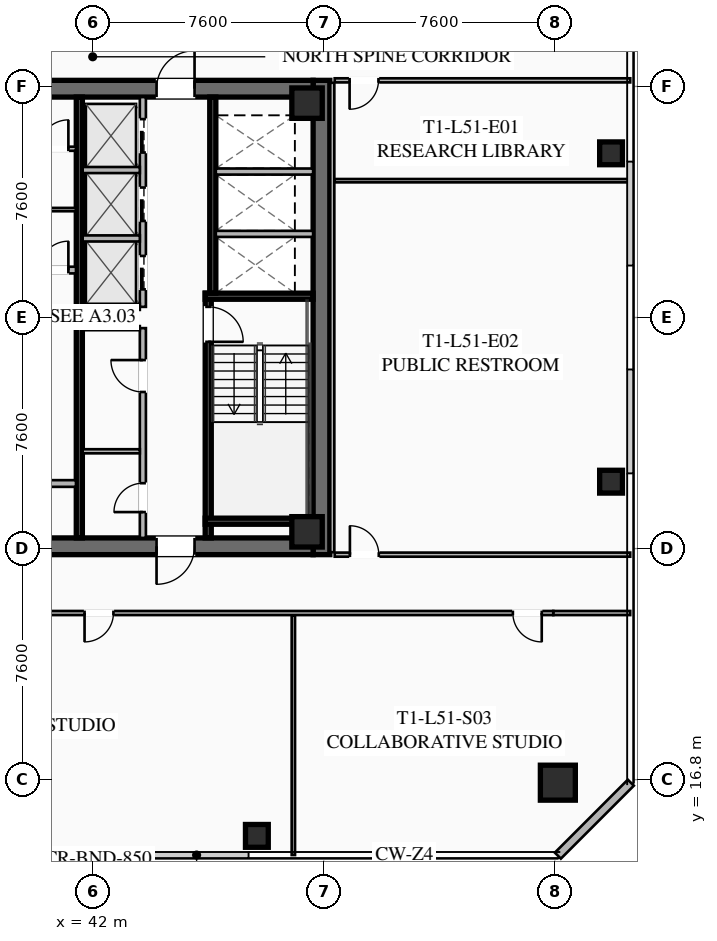
"""IFC4 building model, lengths in metres.
Left out: names, types, materials, properties, quantities, classifications, styles, units other than length and angle.
Written with IfcOpenShell. Run it as: python <this file> out.ifc"""

import sys

from ifc_helpers import new_model, si_unit, direction, frame, frame_2d, origin, origin_2d, place, context, subcontext, project, spatial, rectangle, hollow_rectangle, extrude, element, fill, save


model = new_model("IFC4")
c1 = context("Model", 3, precision=1e-05, world=origin(), true_north=direction((0.0, 1.0)))
c2 = subcontext(c1, "Body", "Model", "MODEL_VIEW")
j1 = project(units=[si_unit("LENGTHUNIT", "METRE"), si_unit("PLANEANGLEUNIT", "RADIAN")], contexts=[c1])
p1 = place(None, origin())
s1 = spatial("IfcSite", under=j1, at=p1, CompositionType="ELEMENT")
p2 = place(p1, origin())
s2 = spatial("IfcBuilding", under=s1, at=p2, CompositionType="ELEMENT")
p3 = place(p2, frame((0.0, 0.0, 188.95)))
s3 = spatial("IfcBuildingStorey", under=s2, at=p3, CompositionType="ELEMENT", Elevation=188.95)
p4 = place(p3, frame((49.525, 39.8, 0.0), z_axis=(0.0, 0.0, 1.0), x_axis=(0.0, -1.0, 0.0)))
e1 = element("IfcWall", 1, at=p4, inside=s3, PredefinedType="SHEAR", context=c2, shape_type="SweptSolid", body=[
    extrude(rectangle(XDim=15.6, YDim=0.55, at=frame_2d((7.8, 0.0))), origin(), (0.0, 0.0, 1.0), 3.55),
])
p5 = place(p3, frame((49.25, 24.475, 0.0), z_axis=(0.0, 0.0, 1.0), x_axis=(-1.0, 0.0, 0.0)))
e2 = element("IfcWall", 2, at=p5, inside=s3, PredefinedType="SHEAR", context=c2, shape_type="SweptSolid", body=[
    extrude(rectangle(XDim=14.5, YDim=0.55, at=frame_2d((7.25, 0.0))), origin(), (0.0, 0.0, 1.0), 3.55),
])
p6 = place(p5, frame((8.95, 0.0, 0.0)))
e3 = element("IfcOpeningElement", 3, at=p6, cuts=e2, PredefinedType="OPENING", context=c2, shape_type="SweptSolid", body=[
    extrude(rectangle(XDim=1.25, YDim=2.25, at=frame_2d((0.625, 1.125))), frame((0.0, 0.285, 0.0), z_axis=(0.0, -1.0, 0.0), x_axis=(1.0, 0.0, 0.0)), (0.0, 0.0, 1.0), 0.57),
])
p7 = place(p5, frame((3.9, 0.0, 0.0)))
e4 = element("IfcOpeningElement", 4, at=p7, cuts=e2, PredefinedType="OPENING", context=c2, shape_type="SweptSolid", body=[
    extrude(rectangle(XDim=1.25, YDim=2.25, at=frame_2d((0.625, 1.125))), frame((0.0, 0.285, 0.0), z_axis=(0.0, -1.0, 0.0), x_axis=(1.0, 0.0, 0.0)), (0.0, 0.0, 1.0), 0.57),
])
p8 = place(p3, frame((34.75, 39.525, 0.0), z_axis=(0.0, 0.0, 1.0), x_axis=(1.0, 0.0, 0.0)))
e5 = element("IfcWall", 5, at=p8, inside=s3, PredefinedType="SHEAR", context=c2, shape_type="SweptSolid", body=[
    extrude(rectangle(XDim=14.5, YDim=0.55, at=frame_2d((7.25, 0.0))), origin(), (0.0, 0.0, 1.0), 3.55),
])
p9 = place(p8, frame((4.3, 0.0, 0.0)))
e6 = element("IfcOpeningElement", 6, at=p9, cuts=e5, PredefinedType="OPENING", context=c2, shape_type="SweptSolid", body=[
    extrude(rectangle(XDim=1.25, YDim=2.25, at=frame_2d((0.625, 1.125))), frame((0.0, 0.285, 0.0), z_axis=(0.0, -1.0, 0.0), x_axis=(1.0, 0.0, 0.0)), (0.0, 0.0, 1.0), 0.57),
])
p10 = place(p8, frame((9.35, 0.0, 0.0)))
e7 = element("IfcOpeningElement", 7, at=p10, cuts=e5, PredefinedType="OPENING", context=c2, shape_type="SweptSolid", body=[
    extrude(rectangle(XDim=1.25, YDim=2.25, at=frame_2d((0.625, 1.125))), frame((0.0, 0.285, 0.0), z_axis=(0.0, -1.0, 0.0), x_axis=(1.0, 0.0, 0.0)), (0.0, 0.0, 1.0), 0.57),
])
for number, where, z_axis, x_axis in (
    (8, (49.05, 24.95, 0.0), (0.0, 0.0, 1.0), (1.0, 0.0, 0.0)),
    (9, (49.05, 39.05, 0.0), (0.0, 0.0, 1.0), (1.0, 0.0, 0.0)),
):
    element("IfcColumn", number, at=place(p3, frame(where, z_axis=z_axis, x_axis=x_axis)), inside=s3, PredefinedType="COLUMN", context=c2, shape_type="SweptSolid", body=[
        extrude(hollow_rectangle(XDim=1.0, YDim=1.0, WallThickness=0.04, at=origin_2d()), origin(), (0.0, 0.0, 1.0), 3.37),
    ])
p11 = place(p3, frame((57.3, 16.7, 0.0), z_axis=(0.0, 0.0, 1.0), x_axis=(1.0, 0.0, 0.0)))
e10 = element("IfcColumn", 10, at=p11, inside=s3, PredefinedType="COLUMN", context=c2, shape_type="SweptSolid", body=[
    extrude(hollow_rectangle(XDim=1.15, YDim=1.15, WallThickness=0.045, at=origin_2d()), origin(), (0.0, 0.0, 1.0), 3.37),
])
for number, where, z_axis, x_axis in (
    (11, (47.4, 14.95, 0.0), (0.0, 0.0, 1.0), (1.0, 0.0, 0.0)),
    (12, (59.05, 26.6, 0.0), (0.0, 0.0, 1.0), (1.0, 0.0, 0.0)),
    (13, (59.05, 37.4, 0.0), (0.0, 0.0, 1.0), (1.0, 0.0, 0.0)),
):
    element("IfcColumn", number, at=place(p3, frame(where, z_axis=z_axis, x_axis=x_axis)), inside=s3, PredefinedType="COLUMN", context=c2, shape_type="SweptSolid", body=[
        extrude(hollow_rectangle(XDim=0.75, YDim=0.75, WallThickness=0.032, at=origin_2d()), origin(), (0.0, 0.0, 1.0), 3.37),
    ])
p12 = place(p3, frame((59.7, 16.7, 0.0), z_axis=(0.0, 0.0, 1.0), x_axis=(-0.707106781187, -0.707106781187, 0.0)))
e14 = element("IfcWall", 14, at=p12, inside=s3, PredefinedType="SOLIDWALL", context=c2, shape_type="SweptSolid", body=[
    extrude(rectangle(XDim=3.394, YDim=0.28, at=frame_2d((1.697, 0.0))), origin(), (0.0, 0.0, 1.0), 3.37),
])
p13 = place(p3, frame((45.8, 32.8, 0.0), z_axis=(0.0, 0.0, 1.0), x_axis=(0.0, -1.0, 0.0)))
e15 = element("IfcWall", 15, at=p13, inside=s3, PredefinedType="SHEAR", context=c2, shape_type="SweptSolid", body=[
    extrude(rectangle(XDim=8.05, YDim=0.2, at=frame_2d((4.025, 0.0))), origin(), (0.0, 0.0, 1.0), 3.37),
])
p14 = place(p13, frame((0.45, 0.0, 0.0)))
e16 = element("IfcOpeningElement", 16, at=p14, cuts=e15, PredefinedType="OPENING", context=c2, shape_type="SweptSolid", body=[
    extrude(rectangle(XDim=1.15, YDim=2.2, at=frame_2d((0.575, 1.1))), frame((0.0, 0.11, 0.0), z_axis=(0.0, -1.0, 0.0), x_axis=(1.0, 0.0, 0.0)), (0.0, 0.0, 1.0), 0.22),
])
for number, where, z_axis, x_axis in (
    (17, (45.7, 32.7, 0.0), (0.0, 0.0, 1.0), (1.0, 0.0, 0.0)),
    (18, (45.7, 25.3, 0.0), (0.0, 0.0, 1.0), (1.0, 0.0, 0.0)),
):
    element("IfcWall", number, at=place(p3, frame(where, z_axis=z_axis, x_axis=x_axis)), inside=s3, PredefinedType="SHEAR", context=c2, shape_type="SweptSolid", body=[
        extrude(rectangle(XDim=3.55, YDim=0.2, at=frame_2d((1.775, 0.0))), origin(), (0.0, 0.0, 1.0), 3.37),
    ])
p15 = place(p3, frame((41.56, 24.75, 0.0), z_axis=(0.0, 0.0, 1.0), x_axis=(0.0, 1.0, 0.0)))
e19 = element("IfcWall", 19, at=p15, inside=s3, PredefinedType="SHEAR", context=c2, shape_type="SweptSolid", body=[
    extrude(rectangle(XDim=14.5, YDim=0.2, at=frame_2d((7.25, 0.0))), origin(), (0.0, 0.0, 1.0), 3.37),
])
p16 = place(p3, frame((38.3, 33.56, 0.0), z_axis=(0.0, 0.0, 1.0), x_axis=(1.0, 0.0, 0.0)))
e20 = element("IfcWall", 20, at=p16, inside=s3, PredefinedType="SOLIDWALL", context=c2, shape_type="SweptSolid", body=[
    extrude(rectangle(XDim=3.15, YDim=0.22, at=frame_2d((1.575, 0.0))), origin(), (0.0, 0.0, 1.0), 2.723),
])
p17 = place(p16, frame((0.25, 0.0, 0.0)))
e21 = element("IfcOpeningElement", 21, at=p17, cuts=e20, PredefinedType="OPENING", context=c2, shape_type="SweptSolid", body=[
    extrude(rectangle(XDim=0.95, YDim=2.05, at=frame_2d((0.475, 1.025))), frame((0.0, 0.12, 0.0), z_axis=(0.0, -1.0, 0.0), x_axis=(1.0, 0.0, 0.0)), (0.0, 0.0, 1.0), 0.24),
])
p18 = place(p16, frame((1.95, 0.0, 0.0)))
e22 = element("IfcOpeningElement", 22, at=p18, cuts=e20, PredefinedType="OPENING", context=c2, shape_type="SweptSolid", body=[
    extrude(rectangle(XDim=0.95, YDim=2.05, at=frame_2d((0.475, 1.025))), frame((0.0, 0.12, 0.0), z_axis=(0.0, -1.0, 0.0), x_axis=(1.0, 0.0, 0.0)), (0.0, 0.0, 1.0), 0.24),
])
p19 = place(p3, frame((38.3, 26.54, 0.0), z_axis=(0.0, 0.0, 1.0), x_axis=(1.0, 0.0, 0.0)))
e23 = element("IfcWall", 23, at=p19, inside=s3, PredefinedType="SOLIDWALL", context=c2, shape_type="SweptSolid", body=[
    extrude(rectangle(XDim=3.15, YDim=0.22, at=frame_2d((1.575, 0.0))), origin(), (0.0, 0.0, 1.0), 2.723),
])
p20 = place(p19, frame((0.95, 0.0, 0.0)))
e24 = element("IfcOpeningElement", 24, at=p20, cuts=e23, PredefinedType="OPENING", context=c2, shape_type="SweptSolid", body=[
    extrude(rectangle(XDim=1.25, YDim=2.25, at=frame_2d((0.625, 1.125))), frame((0.0, 0.12, 0.0), z_axis=(0.0, -1.0, 0.0), x_axis=(1.0, 0.0, 0.0)), (0.0, 0.0, 1.0), 0.24),
])
p21 = place(p3, frame((45.95, 39.25, 0.0), z_axis=(0.0, 0.0, 1.0), x_axis=(0.0, -1.0, 0.0)))
e25 = element("IfcWall", 25, at=p21, inside=s3, PredefinedType="SHEAR", context=c2, shape_type="SweptSolid", body=[
    extrude(rectangle(XDim=6.45, YDim=0.2, at=frame_2d((3.225, 0.0))), origin(), (0.0, 0.0, 1.0), 3.37),
])
for number, where, z_axis, x_axis in (
    (26, (46.05, 34.75, 0.0), (0.0, 0.0, 1.0), (1.0, 0.0, 0.0)),
    (27, (46.05, 36.8, 0.0), (0.0, 0.0, 1.0), (1.0, 0.0, 0.0)),
):
    element("IfcWall", number, at=place(p3, frame(where, z_axis=z_axis, x_axis=x_axis)), inside=s3, PredefinedType="SOLIDWALL", context=c2, shape_type="SweptSolid", body=[
        extrude(rectangle(XDim=3.2, YDim=0.2, at=frame_2d((1.6, 0.0))), origin(), (0.0, 0.0, 1.0), 3.37),
    ])
p22 = place(p3, frame((38.3, 37.55, 0.0), z_axis=(0.0, 0.0, 1.0), x_axis=(1.0, 0.0, 0.0)))
e28 = element("IfcWall", 28, at=p22, inside=s3, PredefinedType="PARTITIONING", context=c2, shape_type="SweptSolid", body=[
    extrude(rectangle(XDim=3.15, YDim=0.135, at=frame_2d((1.575, 0.0))), origin(), (0.0, 0.0, 1.0), 2.723),
])
p23 = place(p22, frame((0.25, 0.0, 0.0)))
e29 = element("IfcOpeningElement", 29, at=p23, cuts=e28, PredefinedType="OPENING", context=c2, shape_type="SweptSolid", body=[
    extrude(rectangle(XDim=0.95, YDim=2.05, at=frame_2d((0.475, 1.025))), frame((0.0, 0.077, 0.0), z_axis=(0.0, -1.0, 0.0), x_axis=(1.0, 0.0, 0.0)), (0.0, 0.0, 1.0), 0.155),
])
p24 = place(p22, frame((1.95, 0.0, 0.0)))
e30 = element("IfcOpeningElement", 30, at=p24, cuts=e28, PredefinedType="OPENING", context=c2, shape_type="SweptSolid", body=[
    extrude(rectangle(XDim=0.95, YDim=2.05, at=frame_2d((0.475, 1.025))), frame((0.0, 0.077, 0.0), z_axis=(0.0, -1.0, 0.0), x_axis=(1.0, 0.0, 0.0)), (0.0, 0.0, 1.0), 0.155),
])
p25 = place(p3, frame((38.3, 35.55, 0.0), z_axis=(0.0, 0.0, 1.0), x_axis=(1.0, 0.0, 0.0)))
e31 = element("IfcWall", 31, at=p25, inside=s3, PredefinedType="PARTITIONING", context=c2, shape_type="SweptSolid", body=[
    extrude(rectangle(XDim=3.15, YDim=0.11, at=frame_2d((1.575, 0.0))), origin(), (0.0, 0.0, 1.0), 2.723),
])
p26 = place(p3, frame((43.65, 24.75, 0.0), z_axis=(0.0, 0.0, 1.0), x_axis=(0.0, 1.0, 0.0)))
e32 = element("IfcWall", 32, at=p26, inside=s3, PredefinedType="SOLIDWALL", context=c2, shape_type="SweptSolid", body=[
    extrude(rectangle(XDim=6.9, YDim=0.2, at=frame_2d((3.45, 0.0))), origin(), (0.0, 0.0, 1.0), 2.723),
])
p27 = place(p26, frame((0.85, 0.0, 0.0)))
e33 = element("IfcOpeningElement", 33, at=p27, cuts=e32, PredefinedType="OPENING", context=c2, shape_type="SweptSolid", body=[
    extrude(rectangle(XDim=0.95, YDim=2.05, at=frame_2d((0.475, 1.025))), frame((0.0, 0.11, 0.0), z_axis=(0.0, -1.0, 0.0), x_axis=(1.0, 0.0, 0.0)), (0.0, 0.0, 1.0), 0.22),
])
p28 = place(p26, frame((4.8, 0.0, 0.0)))
e34 = element("IfcOpeningElement", 34, at=p28, cuts=e32, PredefinedType="OPENING", context=c2, shape_type="SweptSolid", body=[
    extrude(rectangle(XDim=1.05, YDim=2.2, at=frame_2d((0.525, 1.1))), frame((0.0, 0.11, 0.0), z_axis=(0.0, -1.0, 0.0), x_axis=(1.0, 0.0, 0.0)), (0.0, 0.0, 1.0), 0.22),
])
for number, where, z_axis, x_axis in (
    (35, (41.67, 31.65, 0.0), (0.0, 0.0, 1.0), (1.0, 0.0, 0.0)),
    (36, (41.67, 27.6, 0.0), (0.0, 0.0, 1.0), (1.0, 0.0, 0.0)),
):
    element("IfcWall", number, at=place(p3, frame(where, z_axis=z_axis, x_axis=x_axis)), inside=s3, PredefinedType="PARTITIONING", context=c2, shape_type="SweptSolid", body=[
        extrude(rectangle(XDim=1.88, YDim=0.135, at=frame_2d((0.94, 0.0))), origin(), (0.0, 0.0, 1.0), 2.723),
    ])
p29 = place(p3, frame((43.65, 32.35, 0.0), z_axis=(0.0, 0.0, 1.0), x_axis=(0.0, 1.0, 0.0)))
e37 = element("IfcWall", 37, at=p29, inside=s3, PredefinedType="SOLIDWALL", context=c2, shape_type="SweptSolid", body=[
    extrude(rectangle(XDim=6.9, YDim=0.2, at=frame_2d((3.45, 0.0))), origin(), (0.0, 0.0, 1.0), 3.37),
])
p30 = place(p29, frame((0.575, 0.0, 0.0)))
e38 = element("IfcOpeningElement", 38, at=p30, cuts=e37, PredefinedType="OPENING", context=c2, shape_type="SweptSolid", body=[
    extrude(rectangle(XDim=1.1, YDim=2.2, at=frame_2d((0.55, 1.1))), frame((0.0, 0.11, 0.0), z_axis=(0.0, -1.0, 0.0), x_axis=(1.0, 0.0, 0.0)), (0.0, 0.0, 1.0), 0.22),
])
p31 = place(p29, frame((2.825, 0.0, 0.0)))
e39 = element("IfcOpeningElement", 39, at=p31, cuts=e37, PredefinedType="OPENING", context=c2, shape_type="SweptSolid", body=[
    extrude(rectangle(XDim=1.1, YDim=2.2, at=frame_2d((0.55, 1.1))), frame((0.0, 0.11, 0.0), z_axis=(0.0, -1.0, 0.0), x_axis=(1.0, 0.0, 0.0)), (0.0, 0.0, 1.0), 0.22),
])
p32 = place(p29, frame((5.075, 0.0, 0.0)))
e40 = element("IfcOpeningElement", 40, at=p32, cuts=e37, PredefinedType="OPENING", context=c2, shape_type="SweptSolid", body=[
    extrude(rectangle(XDim=1.1, YDim=2.2, at=frame_2d((0.55, 1.1))), frame((0.0, 0.11, 0.0), z_axis=(0.0, -1.0, 0.0), x_axis=(1.0, 0.0, 0.0)), (0.0, 0.0, 1.0), 0.22),
])
for number, where, z_axis, x_axis in (
    (41, (41.67, 32.35, 0.0), (0.0, 0.0, 1.0), (1.0, 0.0, 0.0)),
    (42, (41.67, 34.6, 0.0), (0.0, 0.0, 1.0), (1.0, 0.0, 0.0)),
    (43, (41.67, 36.85, 0.0), (0.0, 0.0, 1.0), (1.0, 0.0, 0.0)),
):
    element("IfcWall", number, at=place(p3, frame(where, z_axis=z_axis, x_axis=x_axis)), inside=s3, PredefinedType="SOLIDWALL", context=c2, shape_type="SweptSolid", body=[
        extrude(rectangle(XDim=1.88, YDim=0.2, at=frame_2d((0.94, 0.0))), origin(), (0.0, 0.0, 1.0), 3.37),
    ])
p33 = place(p3, frame((57.15, 22.28, 0.0), z_axis=(0.0, 0.0, 1.0), x_axis=(-1.0, 0.0, 0.0)))
e44 = element("IfcWall", 44, at=p33, inside=s3, PredefinedType="PARTITIONING", context=c2, shape_type="SweptSolid", body=[
    extrude(rectangle(XDim=30.3, YDim=0.135, at=frame_2d((15.15, 0.0))), origin(), (0.0, 0.0, 1.0), 2.723),
])
p34 = place(p33, frame((28.97, 0.0, 0.0)))
e45 = element("IfcOpeningElement", 45, at=p34, cuts=e44, PredefinedType="OPENING", context=c2, shape_type="SweptSolid", body=[
    extrude(rectangle(XDim=0.95, YDim=2.05, at=frame_2d((0.475, 1.025))), frame((0.0, 0.077, 0.0), z_axis=(0.0, -1.0, 0.0), x_axis=(1.0, 0.0, 0.0)), (0.0, 0.0, 1.0), 0.155),
])
p35 = place(p33, frame((14.468, 0.0, 0.0)))
e46 = element("IfcOpeningElement", 46, at=p35, cuts=e44, PredefinedType="OPENING", context=c2, shape_type="SweptSolid", body=[
    extrude(rectangle(XDim=0.95, YDim=2.05, at=frame_2d((0.475, 1.025))), frame((0.0, 0.077, 0.0), z_axis=(0.0, -1.0, 0.0), x_axis=(1.0, 0.0, 0.0)), (0.0, 0.0, 1.0), 0.155),
])
p36 = place(p33, frame((0.38, 0.0, 0.0)))
e47 = element("IfcOpeningElement", 47, at=p36, cuts=e44, PredefinedType="OPENING", context=c2, shape_type="SweptSolid", body=[
    extrude(rectangle(XDim=0.95, YDim=2.05, at=frame_2d((0.475, 1.025))), frame((0.0, 0.077, 0.0), z_axis=(0.0, -1.0, 0.0), x_axis=(1.0, 0.0, 0.0)), (0.0, 0.0, 1.0), 0.155),
])
p37 = place(p3, frame((57.15, 22.28, 0.0), z_axis=(0.0, 0.0, 1.0), x_axis=(1.0, 0.0, 0.0)))
e48 = element("IfcWall", 48, at=p37, inside=s3, PredefinedType="PARTITIONING", context=c2, shape_type="SweptSolid", body=[
    extrude(rectangle(XDim=2.53, YDim=0.135, at=frame_2d((1.265, 0.0))), origin(), (0.0, 0.0, 1.0), 2.723),
])
p38 = place(p3, frame((48.6, 14.32, 0.0), z_axis=(0.0, 0.0, 1.0), x_axis=(0.0, 1.0, 0.0)))
e49 = element("IfcWall", 49, at=p38, inside=s3, PredefinedType="PARTITIONING", context=c2, shape_type="SweptSolid", body=[
    extrude(rectangle(XDim=7.88, YDim=0.11, at=frame_2d((3.94, 0.0))), origin(), (0.0, 0.0, 1.0), 2.723),
])
p39 = place(p3, frame((49.88, 39.72, 0.0), z_axis=(0.0, 0.0, 1.0), x_axis=(0.0, -1.0, 0.0)))
e50 = element("IfcWall", 50, at=p39, inside=s3, PredefinedType="PARTITIONING", context=c2, shape_type="SweptSolid", body=[
    extrude(rectangle(XDim=15.44, YDim=0.135, at=frame_2d((7.72, 0.0))), origin(), (0.0, 0.0, 1.0), 2.723),
])
p40 = place(p3, frame((59.68, 39.8, 0.0), z_axis=(0.0, 0.0, 1.0), x_axis=(-1.0, 0.0, 0.0)))
e51 = element("IfcWall", 51, at=p40, inside=s3, PredefinedType="PARTITIONING", context=c2, shape_type="SweptSolid", body=[
    extrude(rectangle(XDim=9.72, YDim=0.135, at=frame_2d((4.86, 0.0))), origin(), (0.0, 0.0, 1.0), 2.723),
])
p41 = place(p40, frame((8.28, 0.0, 0.0)))
e52 = element("IfcOpeningElement", 52, at=p41, cuts=e51, PredefinedType="OPENING", context=c2, shape_type="SweptSolid", body=[
    extrude(rectangle(XDim=0.95, YDim=2.05, at=frame_2d((0.475, 1.025))), frame((0.0, 0.077, 0.0), z_axis=(0.0, -1.0, 0.0), x_axis=(1.0, 0.0, 0.0)), (0.0, 0.0, 1.0), 0.155),
])
p42 = place(p3, frame((49.96, 24.2, 0.0), z_axis=(0.0, 0.0, 1.0), x_axis=(1.0, 0.0, 0.0)))
e53 = element("IfcWall", 53, at=p42, inside=s3, PredefinedType="PARTITIONING", context=c2, shape_type="SweptSolid", body=[
    extrude(rectangle(XDim=9.72, YDim=0.135, at=frame_2d((4.86, 0.0))), origin(), (0.0, 0.0, 1.0), 2.723),
])
p43 = place(p42, frame((0.5, 0.0, 0.0)))
e54 = element("IfcOpeningElement", 54, at=p43, cuts=e53, PredefinedType="OPENING", context=c2, shape_type="SweptSolid", body=[
    extrude(rectangle(XDim=0.95, YDim=2.05, at=frame_2d((0.475, 1.025))), frame((0.0, 0.077, 0.0), z_axis=(0.0, -1.0, 0.0), x_axis=(1.0, 0.0, 0.0)), (0.0, 0.0, 1.0), 0.155),
])
p44 = place(p3, frame((49.96, 36.5, 0.0), z_axis=(0.0, 0.0, 1.0), x_axis=(1.0, 0.0, 0.0)))
e55 = element("IfcWall", 55, at=p44, inside=s3, PredefinedType="PARTITIONING", context=c2, shape_type="SweptSolid", body=[
    extrude(rectangle(XDim=9.72, YDim=0.11, at=frame_2d((4.86, 0.0))), origin(), (0.0, 0.0, 1.0), 2.723),
])
p45 = place(p10, origin())
e56 = element("IfcDoor", 56, at=p45, inside=s3, OperationType="SINGLE_SWING_RIGHT", PredefinedType="DOOR", context=c2, shape_type="SweptSolid", body=[
    extrude(rectangle(XDim=1.25, YDim=2.25, at=frame_2d((0.625, 1.125))), frame((0.0, 0.025, 0.0), z_axis=(0.0, -1.0, 0.0), x_axis=(1.0, 0.0, 0.0)), (0.0, 0.0, 1.0), 0.05),
])
fill(e7, e56)
p46 = place(p7, origin())
e57 = element("IfcDoor", 57, at=p46, inside=s3, OperationType="SINGLE_SWING_RIGHT", PredefinedType="DOOR", context=c2, shape_type="SweptSolid", body=[
    extrude(rectangle(XDim=1.25, YDim=2.25, at=frame_2d((0.625, 1.125))), frame((0.0, 0.025, 0.0), z_axis=(0.0, -1.0, 0.0), x_axis=(1.0, 0.0, 0.0)), (0.0, 0.0, 1.0), 0.05),
])
fill(e4, e57)
p47 = place(p14, origin())
e58 = element("IfcDoor", 58, at=p47, inside=s3, OperationType="SINGLE_SWING_RIGHT", PredefinedType="DOOR", context=c2, shape_type="SweptSolid", body=[
    extrude(rectangle(XDim=1.15, YDim=2.2, at=frame_2d((0.575, 1.1))), frame((0.0, 0.025, 0.0), z_axis=(0.0, -1.0, 0.0), x_axis=(1.0, 0.0, 0.0)), (0.0, 0.0, 1.0), 0.05),
])
fill(e16, e58)
p48 = place(p24, origin())
e59 = element("IfcDoor", 59, at=p48, inside=s3, OperationType="SINGLE_SWING_RIGHT", PredefinedType="DOOR", context=c2, shape_type="SweptSolid", body=[
    extrude(rectangle(XDim=0.95, YDim=2.05, at=frame_2d((0.475, 1.025))), frame((0.0, 0.025, 0.0), z_axis=(0.0, -1.0, 0.0), x_axis=(1.0, 0.0, 0.0)), (0.0, 0.0, 1.0), 0.05),
])
fill(e30, e59)
p49 = place(p18, origin())
e60 = element("IfcDoor", 60, at=p49, inside=s3, OperationType="SINGLE_SWING_RIGHT", PredefinedType="DOOR", context=c2, shape_type="SweptSolid", body=[
    extrude(rectangle(XDim=0.95, YDim=2.05, at=frame_2d((0.475, 1.025))), frame((0.0, 0.025, 0.0), z_axis=(0.0, -1.0, 0.0), x_axis=(1.0, 0.0, 0.0)), (0.0, 0.0, 1.0), 0.05),
])
fill(e22, e60)
p50 = place(p27, origin())
e61 = element("IfcDoor", 61, at=p50, inside=s3, OperationType="SINGLE_SWING_LEFT", PredefinedType="DOOR", context=c2, shape_type="SweptSolid", body=[
    extrude(rectangle(XDim=0.95, YDim=2.05, at=frame_2d((0.475, 1.025))), frame((0.0, 0.025, 0.0), z_axis=(0.0, -1.0, 0.0), x_axis=(1.0, 0.0, 0.0)), (0.0, 0.0, 1.0), 0.05),
])
fill(e33, e61)
p51 = place(p28, origin())
e62 = element("IfcDoor", 62, at=p51, inside=s3, OperationType="SINGLE_SWING_RIGHT", PredefinedType="DOOR", context=c2, shape_type="SweptSolid", body=[
    extrude(rectangle(XDim=1.05, YDim=2.2, at=frame_2d((0.525, 1.1))), frame((0.0, 0.025, 0.0), z_axis=(0.0, -1.0, 0.0), x_axis=(1.0, 0.0, 0.0)), (0.0, 0.0, 1.0), 0.05),
])
fill(e34, e62)
p52 = place(p35, origin())
e63 = element("IfcDoor", 63, at=p52, inside=s3, OperationType="SINGLE_SWING_RIGHT", PredefinedType="DOOR", context=c2, shape_type="SweptSolid", body=[
    extrude(rectangle(XDim=0.95, YDim=2.05, at=frame_2d((0.475, 1.025))), frame((0.0, 0.025, 0.0), z_axis=(0.0, -1.0, 0.0), x_axis=(1.0, 0.0, 0.0)), (0.0, 0.0, 1.0), 0.05),
])
fill(e46, e63)
p53 = place(p36, origin())
e64 = element("IfcDoor", 64, at=p53, inside=s3, OperationType="SINGLE_SWING_LEFT", PredefinedType="DOOR", context=c2, shape_type="SweptSolid", body=[
    extrude(rectangle(XDim=0.95, YDim=2.05, at=frame_2d((0.475, 1.025))), frame((0.0, 0.025, 0.0), z_axis=(0.0, -1.0, 0.0), x_axis=(1.0, 0.0, 0.0)), (0.0, 0.0, 1.0), 0.05),
])
fill(e47, e64)
p54 = place(p41, origin())
e65 = element("IfcDoor", 65, at=p54, inside=s3, OperationType="SINGLE_SWING_RIGHT", PredefinedType="DOOR", context=c2, shape_type="SweptSolid", body=[
    extrude(rectangle(XDim=0.95, YDim=2.05, at=frame_2d((0.475, 1.025))), frame((0.0, 0.025, 0.0), z_axis=(0.0, -1.0, 0.0), x_axis=(1.0, 0.0, 0.0)), (0.0, 0.0, 1.0), 0.05),
])
fill(e52, e65)
p55 = place(p43, origin())
e66 = element("IfcDoor", 66, at=p55, inside=s3, OperationType="SINGLE_SWING_LEFT", PredefinedType="DOOR", context=c2, shape_type="SweptSolid", body=[
    extrude(rectangle(XDim=0.95, YDim=2.05, at=frame_2d((0.475, 1.025))), frame((0.0, 0.025, 0.0), z_axis=(0.0, -1.0, 0.0), x_axis=(1.0, 0.0, 0.0)), (0.0, 0.0, 1.0), 0.05),
])
fill(e54, e66)
p56 = place(p30, origin())
e67 = element("IfcDoor", 67, at=p56, inside=s3, OperationType="SLIDING_TO_LEFT", PredefinedType="DOOR", context=c2, shape_type="SweptSolid", body=[
    extrude(rectangle(XDim=1.1, YDim=2.2, at=frame_2d((0.55, 1.1))), frame((0.0, 0.025, 0.0), z_axis=(0.0, -1.0, 0.0), x_axis=(1.0, 0.0, 0.0)), (0.0, 0.0, 1.0), 0.05),
])
fill(e38, e67)
p57 = place(p31, origin())
e68 = element("IfcDoor", 68, at=p57, inside=s3, OperationType="SLIDING_TO_LEFT", PredefinedType="DOOR", context=c2, shape_type="SweptSolid", body=[
    extrude(rectangle(XDim=1.1, YDim=2.2, at=frame_2d((0.55, 1.1))), frame((0.0, 0.025, 0.0), z_axis=(0.0, -1.0, 0.0), x_axis=(1.0, 0.0, 0.0)), (0.0, 0.0, 1.0), 0.05),
])
fill(e39, e68)
p58 = place(p32, origin())
e69 = element("IfcDoor", 69, at=p58, inside=s3, OperationType="SLIDING_TO_LEFT", PredefinedType="DOOR", context=c2, shape_type="SweptSolid", body=[
    extrude(rectangle(XDim=1.1, YDim=2.2, at=frame_2d((0.55, 1.1))), frame((0.0, 0.025, 0.0), z_axis=(0.0, -1.0, 0.0), x_axis=(1.0, 0.0, 0.0)), (0.0, 0.0, 1.0), 0.05),
])
fill(e40, e69)
save(model, sys.argv[1])
